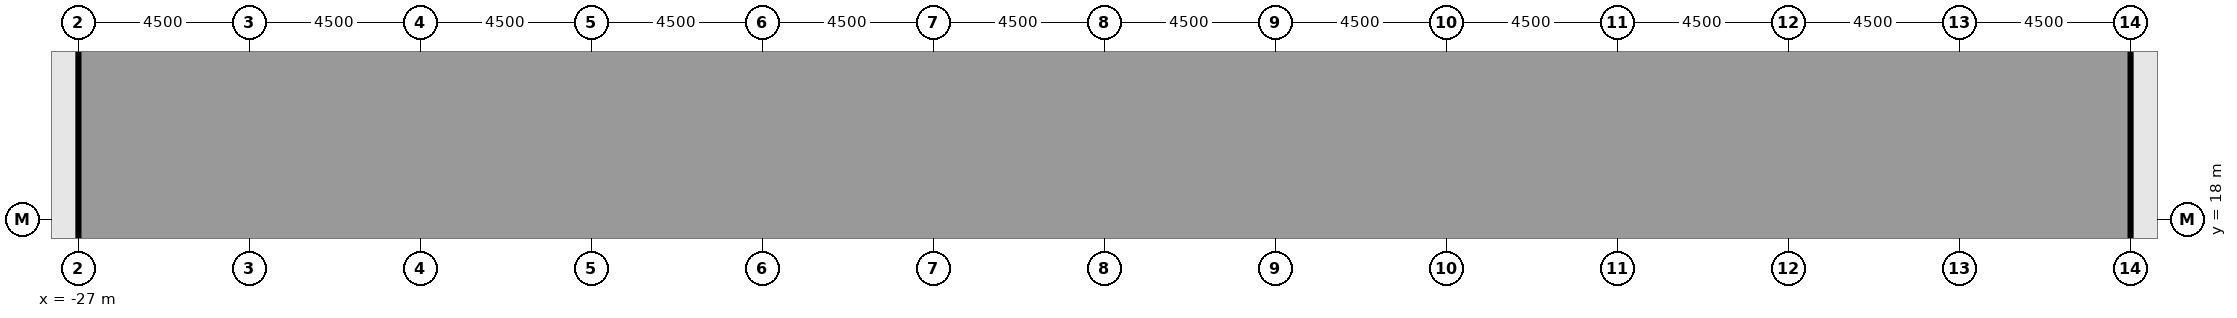
"""IFC4 building model, lengths in metres.
Left out: names, types, materials, properties, quantities, classifications, styles, units other than length and angle.
Written with IfcOpenShell. Run it as: python <this file> out.ifc"""

import sys

from ifc_helpers import new_model, si_unit, direction, frame, frame_2d, origin, origin_2d, place, context, subcontext, project, spatial, rectangle, extrude, element, fill, save


model = new_model("IFC4")
c1 = context("Model", 3, precision=1e-05, world=origin(), true_north=direction((0.0, 1.0)))
c2 = subcontext(c1, "Body", "Model", "MODEL_VIEW")
j1 = project(units=[si_unit("LENGTHUNIT", "METRE"), si_unit("PLANEANGLEUNIT", "RADIAN")], contexts=[c1])
p1 = place(None, origin())
s1 = spatial("IfcSite", under=j1, at=p1, CompositionType="ELEMENT")
p2 = place(p1, origin())
s2 = spatial("IfcBuilding", under=s1, at=p2, CompositionType="ELEMENT")
p3 = place(p2, frame((0.0, 0.0, 7.2)))
s3 = spatial("IfcBuildingStorey", under=s2, at=p3, CompositionType="ELEMENT", Elevation=7.2)
for number, where, z_axis, x_axis in (
    (1, (-27.0, 18.0, -0.45), (0.0, 0.0, 1.0), (1.0, 0.0, 0.0)),
    (2, (-27.0, 22.5, -0.45), (0.0, 0.0, 1.0), (1.0, 0.0, 0.0)),
    (3, (27.0, 18.0, -0.45), (0.0, 0.0, 1.0), (1.0, 0.0, 0.0)),
    (4, (27.0, 22.5, -0.45), (0.0, 0.0, 1.0), (1.0, 0.0, 0.0)),
):
    element("IfcColumn", number, at=place(p3, frame(where, z_axis=z_axis, x_axis=x_axis)), inside=s3, PredefinedType="COLUMN", context=c2, shape_type="SweptSolid", body=[
        extrude(rectangle(XDim=1.4, YDim=1.4, at=origin_2d()), origin(), (0.0, 0.0, 1.0), 4.55),
    ])
for number, where, z_axis, x_axis in (
    (5, (-18.0, 18.0, 0.0), (0.0, 0.0, 1.0), (1.0, 0.0, 0.0)),
    (6, (-18.0, 22.5, 0.0), (0.0, 0.0, 1.0), (1.0, 0.0, 0.0)),
    (7, (-9.0, 22.5, 0.0), (0.0, 0.0, 1.0), (1.0, 0.0, 0.0)),
    (8, (0.0, 22.5, 0.0), (0.0, 0.0, 1.0), (1.0, 0.0, 0.0)),
    (9, (9.0, 22.5, 0.0), (0.0, 0.0, 1.0), (1.0, 0.0, 0.0)),
    (10, (18.0, 22.5, 0.0), (0.0, 0.0, 1.0), (1.0, 0.0, 0.0)),
    (11, (22.5, 18.0, 0.0), (0.0, 0.0, 1.0), (1.0, 0.0, 0.0)),
):
    element("IfcColumn", number, at=place(p3, frame(where, z_axis=z_axis, x_axis=x_axis)), inside=s3, PredefinedType="COLUMN", context=c2, shape_type="SweptSolid", body=[
        extrude(rectangle(XDim=1.6, YDim=1.6, at=origin_2d()), origin(), (0.0, 0.0, 1.0), 4.1),
    ])
p4 = place(p3, frame((-10.0, -9.0, 0.0), z_axis=(0.0, 0.0, 1.0), x_axis=(0.0, 1.0, 0.0)))
e12 = element("IfcWall", 12, at=p4, inside=s3, PredefinedType="SHEAR", context=c2, shape_type="SweptSolid", body=[
    extrude(rectangle(XDim=27.5, YDim=1.0, at=frame_2d((13.75, 0.0))), origin(), (0.0, 0.0, 1.0), 4.1),
])
p5 = place(p4, frame((12.55, 0.0, 0.0)))
e13 = element("IfcOpeningElement", 13, at=p5, cuts=e12, PredefinedType="OPENING", context=c2, shape_type="SweptSolid", body=[
    extrude(rectangle(XDim=2.4, YDim=2.4, at=frame_2d((1.2, 1.2))), frame((0.0, 0.51, 0.0), z_axis=(0.0, -1.0, 0.0), x_axis=(1.0, 0.0, 0.0)), (0.0, 0.0, 1.0), 1.02),
])
p6 = place(p4, frame((6.825, 0.0, 0.0)))
e14 = element("IfcOpeningElement", 14, at=p6, cuts=e12, PredefinedType="OPENING", context=c2, shape_type="SweptSolid", body=[
    extrude(rectangle(XDim=1.2, YDim=2.1, at=frame_2d((0.6, 1.05))), frame((0.0, 0.51, 0.0), z_axis=(0.0, -1.0, 0.0), x_axis=(1.0, 0.0, 0.0)), (0.0, 0.0, 1.0), 1.02),
])
p7 = place(p4, frame((19.475, 0.0, 0.0)))
e15 = element("IfcOpeningElement", 15, at=p7, cuts=e12, PredefinedType="OPENING", context=c2, shape_type="SweptSolid", body=[
    extrude(rectangle(XDim=1.2, YDim=2.1, at=frame_2d((0.6, 1.05))), frame((0.0, 0.51, 0.0), z_axis=(0.0, -1.0, 0.0), x_axis=(1.0, 0.0, 0.0)), (0.0, 0.0, 1.0), 1.02),
])
p8 = place(p3, frame((1.0, -9.0, 0.0), z_axis=(0.0, 0.0, 1.0), x_axis=(0.0, 1.0, 0.0)))
e16 = element("IfcWall", 16, at=p8, inside=s3, PredefinedType="SHEAR", context=c2, shape_type="SweptSolid", body=[
    extrude(rectangle(XDim=27.5, YDim=1.0, at=frame_2d((13.75, 0.0))), origin(), (0.0, 0.0, 1.0), 4.1),
])
p9 = place(p8, frame((12.55, 0.0, 0.0)))
e17 = element("IfcOpeningElement", 17, at=p9, cuts=e16, PredefinedType="OPENING", context=c2, shape_type="SweptSolid", body=[
    extrude(rectangle(XDim=2.4, YDim=2.4, at=frame_2d((1.2, 1.2))), frame((0.0, 0.51, 0.0), z_axis=(0.0, -1.0, 0.0), x_axis=(1.0, 0.0, 0.0)), (0.0, 0.0, 1.0), 1.02),
])
p10 = place(p8, frame((4.025, 0.0, 0.0)))
e18 = element("IfcOpeningElement", 18, at=p10, cuts=e16, PredefinedType="OPENING", context=c2, shape_type="SweptSolid", body=[
    extrude(rectangle(XDim=1.2, YDim=2.1, at=frame_2d((0.6, 1.05))), frame((0.0, 0.51, 0.0), z_axis=(0.0, -1.0, 0.0), x_axis=(1.0, 0.0, 0.0)), (0.0, 0.0, 1.0), 1.02),
])
p11 = place(p8, frame((22.275, 0.0, 0.0)))
e19 = element("IfcOpeningElement", 19, at=p11, cuts=e16, PredefinedType="OPENING", context=c2, shape_type="SweptSolid", body=[
    extrude(rectangle(XDim=1.2, YDim=2.1, at=frame_2d((0.6, 1.05))), frame((0.0, 0.51, 0.0), z_axis=(0.0, -1.0, 0.0), x_axis=(1.0, 0.0, 0.0)), (0.0, 0.0, 1.0), 1.02),
])
p12 = place(p3, frame((-9.5, 18.0, 0.0), z_axis=(0.0, 0.0, 1.0), x_axis=(1.0, 0.0, 0.0)))
e20 = element("IfcWall", 20, at=p12, inside=s3, PredefinedType="SHEAR", context=c2, shape_type="SweptSolid", body=[
    extrude(rectangle(XDim=10.0, YDim=1.0, at=frame_2d((5.0, 0.0))), origin(), (0.0, 0.0, 1.0), 4.1),
])
p13 = place(p3, frame((6.5, -9.0, 0.0), z_axis=(0.0, 0.0, 1.0), x_axis=(0.0, 1.0, 0.0)))
e21 = element("IfcWall", 21, at=p13, inside=s3, PredefinedType="SHEAR", context=c2, shape_type="SweptSolid", body=[
    extrude(rectangle(XDim=27.5, YDim=1.0, at=frame_2d((13.75, 0.0))), origin(), (0.0, 0.0, 1.0), 4.1),
])
p14 = place(p13, frame((12.55, 0.0, 0.0)))
e22 = element("IfcOpeningElement", 22, at=p14, cuts=e21, PredefinedType="OPENING", context=c2, shape_type="SweptSolid", body=[
    extrude(rectangle(XDim=2.4, YDim=2.4, at=frame_2d((1.2, 1.2))), frame((0.0, 0.51, 0.0), z_axis=(0.0, -1.0, 0.0), x_axis=(1.0, 0.0, 0.0)), (0.0, 0.0, 1.0), 1.02),
])
p15 = place(p13, frame((4.025, 0.0, 0.0)))
e23 = element("IfcOpeningElement", 23, at=p15, cuts=e21, PredefinedType="OPENING", context=c2, shape_type="SweptSolid", body=[
    extrude(rectangle(XDim=1.2, YDim=2.1, at=frame_2d((0.6, 1.05))), frame((0.0, 0.51, 0.0), z_axis=(0.0, -1.0, 0.0), x_axis=(1.0, 0.0, 0.0)), (0.0, 0.0, 1.0), 1.02),
])
p16 = place(p13, frame((22.275, 0.0, 0.0)))
e24 = element("IfcOpeningElement", 24, at=p16, cuts=e21, PredefinedType="OPENING", context=c2, shape_type="SweptSolid", body=[
    extrude(rectangle(XDim=1.2, YDim=2.1, at=frame_2d((0.6, 1.05))), frame((0.0, 0.51, 0.0), z_axis=(0.0, -1.0, 0.0), x_axis=(1.0, 0.0, 0.0)), (0.0, 0.0, 1.0), 1.02),
])
p17 = place(p3, frame((17.5, -9.0, 0.0), z_axis=(0.0, 0.0, 1.0), x_axis=(0.0, 1.0, 0.0)))
e25 = element("IfcWall", 25, at=p17, inside=s3, PredefinedType="SHEAR", context=c2, shape_type="SweptSolid", body=[
    extrude(rectangle(XDim=27.5, YDim=1.0, at=frame_2d((13.75, 0.0))), origin(), (0.0, 0.0, 1.0), 4.1),
])
p18 = place(p17, frame((12.55, 0.0, 0.0)))
e26 = element("IfcOpeningElement", 26, at=p18, cuts=e25, PredefinedType="OPENING", context=c2, shape_type="SweptSolid", body=[
    extrude(rectangle(XDim=2.4, YDim=2.4, at=frame_2d((1.2, 1.2))), frame((0.0, 0.51, 0.0), z_axis=(0.0, -1.0, 0.0), x_axis=(1.0, 0.0, 0.0)), (0.0, 0.0, 1.0), 1.02),
])
p19 = place(p17, frame((6.825, 0.0, 0.0)))
e27 = element("IfcOpeningElement", 27, at=p19, cuts=e25, PredefinedType="OPENING", context=c2, shape_type="SweptSolid", body=[
    extrude(rectangle(XDim=1.2, YDim=2.1, at=frame_2d((0.6, 1.05))), frame((0.0, 0.51, 0.0), z_axis=(0.0, -1.0, 0.0), x_axis=(1.0, 0.0, 0.0)), (0.0, 0.0, 1.0), 1.02),
])
p20 = place(p17, frame((19.475, 0.0, 0.0)))
e28 = element("IfcOpeningElement", 28, at=p20, cuts=e25, PredefinedType="OPENING", context=c2, shape_type="SweptSolid", body=[
    extrude(rectangle(XDim=1.2, YDim=2.1, at=frame_2d((0.6, 1.05))), frame((0.0, 0.51, 0.0), z_axis=(0.0, -1.0, 0.0), x_axis=(1.0, 0.0, 0.0)), (0.0, 0.0, 1.0), 1.02),
])
p21 = place(p3, frame((7.0, 18.0, 0.0), z_axis=(0.0, 0.0, 1.0), x_axis=(1.0, 0.0, 0.0)))
e29 = element("IfcWall", 29, at=p21, inside=s3, PredefinedType="SHEAR", context=c2, shape_type="SweptSolid", body=[
    extrude(rectangle(XDim=10.0, YDim=1.0, at=frame_2d((5.0, 0.0))), origin(), (0.0, 0.0, 1.0), 4.1),
])
p22 = place(p3, frame((27.0, 21.8, 0.0), z_axis=(0.0, 0.0, 1.0), x_axis=(0.0, -1.0, 0.0)))
e30 = element("IfcWall", 30, at=p22, inside=s3, PredefinedType="SOLIDWALL", context=c2, shape_type="SweptSolid", body=[
    extrude(rectangle(XDim=3.1, YDim=0.3, at=frame_2d((1.55, 0.0))), origin(), (0.0, 0.0, 1.0), 2.75),
])
p23 = place(p22, frame((0.575, 0.0, 0.8)))
e31 = element("IfcOpeningElement", 31, at=p23, cuts=e30, PredefinedType="OPENING", context=c2, shape_type="SweptSolid", body=[
    extrude(rectangle(XDim=2.4, YDim=1.7, at=frame_2d((1.2, 0.85))), frame((0.0, 0.16, 0.0), z_axis=(0.0, -1.0, 0.0), x_axis=(1.0, 0.0, 0.0)), (0.0, 0.0, 1.0), 0.32),
])
p24 = place(p3, frame((-27.0, 18.7, 0.0), z_axis=(0.0, 0.0, 1.0), x_axis=(0.0, 1.0, 0.0)))
e32 = element("IfcWall", 32, at=p24, inside=s3, PredefinedType="SOLIDWALL", context=c2, shape_type="SweptSolid", body=[
    extrude(rectangle(XDim=3.1, YDim=0.3, at=frame_2d((1.55, 0.0))), origin(), (0.0, 0.0, 1.0), 2.75),
])
p25 = place(p24, frame((0.125, 0.0, 0.8)))
e33 = element("IfcOpeningElement", 33, at=p25, cuts=e32, PredefinedType="OPENING", context=c2, shape_type="SweptSolid", body=[
    extrude(rectangle(XDim=2.4, YDim=1.7, at=frame_2d((1.2, 0.85))), frame((0.0, 0.16, 0.0), z_axis=(0.0, -1.0, 0.0), x_axis=(1.0, 0.0, 0.0)), (0.0, 0.0, 1.0), 0.32),
])
p26 = place(p3, frame((-19.8, -9.0, 0.0), z_axis=(0.0, 0.0, 1.0), x_axis=(0.0, 1.0, 0.0)))
e34 = element("IfcWall", 34, at=p26, inside=s3, PredefinedType="PARTITIONING", context=c2, shape_type="SweptSolid", body=[
    extrude(rectangle(XDim=27.5, YDim=0.15, at=frame_2d((13.75, 0.0))), origin(), (0.0, 0.0, 1.0), 3.65),
])
p27 = place(p26, frame((2.85, 0.0, 0.0)))
e35 = element("IfcOpeningElement", 35, at=p27, cuts=e34, PredefinedType="OPENING", context=c2, shape_type="SweptSolid", body=[
    extrude(rectangle(XDim=1.0, YDim=2.1, at=frame_2d((0.5, 1.05))), frame((0.0, 0.085, 0.0), z_axis=(0.0, -1.0, 0.0), x_axis=(1.0, 0.0, 0.0)), (0.0, 0.0, 1.0), 0.17),
])
p28 = place(p26, frame((15.85, 0.0, 0.0)))
e36 = element("IfcOpeningElement", 36, at=p28, cuts=e34, PredefinedType="OPENING", context=c2, shape_type="SweptSolid", body=[
    extrude(rectangle(XDim=1.0, YDim=2.1, at=frame_2d((0.5, 1.05))), frame((0.0, 0.085, 0.0), z_axis=(0.0, -1.0, 0.0), x_axis=(1.0, 0.0, 0.0)), (0.0, 0.0, 1.0), 0.17),
])
p29 = place(p26, frame((24.35, 0.0, 0.0)))
e37 = element("IfcOpeningElement", 37, at=p29, cuts=e34, PredefinedType="OPENING", context=c2, shape_type="SweptSolid", body=[
    extrude(rectangle(XDim=1.0, YDim=2.1, at=frame_2d((0.5, 1.05))), frame((0.0, 0.085, 0.0), z_axis=(0.0, -1.0, 0.0), x_axis=(1.0, 0.0, 0.0)), (0.0, 0.0, 1.0), 0.17),
])
p30 = place(p3, frame((-13.5, -9.0, 0.0), z_axis=(0.0, 0.0, 1.0), x_axis=(0.0, 1.0, 0.0)))
e38 = element("IfcWall", 38, at=p30, inside=s3, PredefinedType="PARTITIONING", context=c2, shape_type="SweptSolid", body=[
    extrude(rectangle(XDim=27.5, YDim=0.2, at=frame_2d((13.75, 0.0))), origin(), (0.0, 0.0, 1.0), 3.65),
])
p31 = place(p30, frame((3.85, 0.0, 0.0)))
e39 = element("IfcOpeningElement", 39, at=p31, cuts=e38, PredefinedType="OPENING", context=c2, shape_type="SweptSolid", body=[
    extrude(rectangle(XDim=1.0, YDim=2.1, at=frame_2d((0.5, 1.05))), frame((0.0, 0.11, 0.0), z_axis=(0.0, -1.0, 0.0), x_axis=(1.0, 0.0, 0.0)), (0.0, 0.0, 1.0), 0.22),
])
p32 = place(p30, frame((15.1, 0.0, 0.0)))
e40 = element("IfcOpeningElement", 40, at=p32, cuts=e38, PredefinedType="OPENING", context=c2, shape_type="SweptSolid", body=[
    extrude(rectangle(XDim=1.0, YDim=2.1, at=frame_2d((0.5, 1.05))), frame((0.0, 0.11, 0.0), z_axis=(0.0, -1.0, 0.0), x_axis=(1.0, 0.0, 0.0)), (0.0, 0.0, 1.0), 0.22),
])
for number, where, z_axis, x_axis in (
    (41, (-4.5, 21.5, 0.0), (0.0, 0.0, 1.0), (0.0, 1.0, 0.0)),
    (42, (4.5, 21.5, 0.0), (0.0, 0.0, 1.0), (0.0, 1.0, 0.0)),
    (43, (13.5, 21.5, 0.0), (0.0, 0.0, 1.0), (0.0, 1.0, 0.0)),
):
    element("IfcWall", number, at=place(p3, frame(where, z_axis=z_axis, x_axis=x_axis)), inside=s3, PredefinedType="PARTITIONING", context=c2, shape_type="SweptSolid", body=[
        extrude(rectangle(XDim=4.8, YDim=0.2, at=frame_2d((2.4, 0.0))), origin(), (0.0, 0.0, 1.0), 3.65),
    ])
p33 = place(p3, frame((21.0, 18.5, 0.0), z_axis=(0.0, 0.0, 1.0), x_axis=(0.0, -1.0, 0.0)))
e44 = element("IfcWall", 44, at=p33, inside=s3, PredefinedType="PARTITIONING", context=c2, shape_type="SweptSolid", body=[
    extrude(rectangle(XDim=27.5, YDim=0.2, at=frame_2d((13.75, 0.0))), origin(), (0.0, 0.0, 1.0), 3.65),
])
p34 = place(p33, frame((21.9, 0.0, 0.0)))
e45 = element("IfcOpeningElement", 45, at=p34, cuts=e44, PredefinedType="OPENING", context=c2, shape_type="SweptSolid", body=[
    extrude(rectangle(XDim=1.0, YDim=2.1, at=frame_2d((0.5, 1.05))), frame((0.0, 0.11, 0.0), z_axis=(0.0, -1.0, 0.0), x_axis=(1.0, 0.0, 0.0)), (0.0, 0.0, 1.0), 0.22),
])
p35 = place(p33, frame((10.4, 0.0, 0.0)))
e46 = element("IfcOpeningElement", 46, at=p35, cuts=e44, PredefinedType="OPENING", context=c2, shape_type="SweptSolid", body=[
    extrude(rectangle(XDim=1.0, YDim=2.1, at=frame_2d((0.5, 1.05))), frame((0.0, 0.11, 0.0), z_axis=(0.0, -1.0, 0.0), x_axis=(1.0, 0.0, 0.0)), (0.0, 0.0, 1.0), 0.22),
])
p36 = place(p3, frame((-18.8, 18.5, 0.0), z_axis=(0.0, 0.0, 1.0), x_axis=(-1.0, 0.0, 0.0)))
e47 = element("IfcWall", 47, at=p36, inside=s3, PredefinedType="PARTITIONING", context=c2, shape_type="SweptSolid", body=[
    extrude(rectangle(XDim=7.5, YDim=0.2, at=frame_2d((3.75, 0.0))), origin(), (0.0, 0.0, 1.0), 3.65),
])
p37 = place(p36, frame((4.6, 0.0, 0.0)))
e48 = element("IfcOpeningElement", 48, at=p37, cuts=e47, PredefinedType="OPENING", context=c2, shape_type="SweptSolid", body=[
    extrude(rectangle(XDim=1.0, YDim=2.1, at=frame_2d((0.5, 1.05))), frame((0.0, 0.11, 0.0), z_axis=(0.0, -1.0, 0.0), x_axis=(1.0, 0.0, 0.0)), (0.0, 0.0, 1.0), 0.22),
])
p38 = place(p3, frame((-17.2, 18.5, 0.0), z_axis=(0.0, 0.0, 1.0), x_axis=(1.0, 0.0, 0.0)))
e49 = element("IfcWall", 49, at=p38, inside=s3, PredefinedType="PARTITIONING", context=c2, shape_type="SweptSolid", body=[
    extrude(rectangle(XDim=3.7, YDim=0.2, at=frame_2d((1.85, 0.0))), origin(), (0.0, 0.0, 1.0), 3.65),
])
p39 = place(p3, frame((1.5, 18.5, 0.0), z_axis=(0.0, 0.0, 1.0), x_axis=(1.0, 0.0, 0.0)))
e50 = element("IfcWall", 50, at=p39, inside=s3, PredefinedType="PARTITIONING", context=c2, shape_type="SweptSolid", body=[
    extrude(rectangle(XDim=4.5, YDim=0.2, at=frame_2d((2.25, 0.0))), origin(), (0.0, 0.0, 1.0), 3.65),
])
p40 = place(p3, frame((21.0, 18.5, 0.0), z_axis=(0.0, 0.0, 1.0), x_axis=(1.0, 0.0, 0.0)))
e51 = element("IfcWall", 51, at=p40, inside=s3, PredefinedType="PARTITIONING", context=c2, shape_type="SweptSolid", body=[
    extrude(rectangle(XDim=0.7, YDim=0.2, at=frame_2d((0.35, 0.0))), origin(), (0.0, 0.0, 1.0), 3.65),
])
p41 = place(p3, frame((26.3, 18.5, 0.0), z_axis=(0.0, 0.0, 1.0), x_axis=(-1.0, 0.0, 0.0)))
e52 = element("IfcWall", 52, at=p41, inside=s3, PredefinedType="PARTITIONING", context=c2, shape_type="SweptSolid", body=[
    extrude(rectangle(XDim=3.0, YDim=0.2, at=frame_2d((1.5, 0.0))), origin(), (0.0, 0.0, 1.0), 3.65),
])
p42 = place(p41, frame((1.7, 0.0, 0.0)))
e53 = element("IfcOpeningElement", 53, at=p42, cuts=e52, PredefinedType="OPENING", context=c2, shape_type="SweptSolid", body=[
    extrude(rectangle(XDim=1.0, YDim=2.1, at=frame_2d((0.5, 1.05))), frame((0.0, 0.11, 0.0), z_axis=(0.0, -1.0, 0.0), x_axis=(1.0, 0.0, 0.0)), (0.0, 0.0, 1.0), 0.22),
])
p43 = place(p3, frame((-26.85, 21.5, 0.0), z_axis=(0.0, 0.0, 1.0), x_axis=(1.0, 0.0, 0.0)))
e54 = element("IfcWall", 54, at=p43, inside=s3, PredefinedType="PARTITIONING", context=c2, shape_type="SweptSolid", body=[
    extrude(rectangle(XDim=53.7, YDim=0.2, at=frame_2d((26.85, 0.0))), origin(), (0.0, 0.0, 1.0), 3.65),
])
p44 = place(p43, frame((2.7, 0.0, 0.0)))
e55 = element("IfcOpeningElement", 55, at=p44, cuts=e54, PredefinedType="OPENING", context=c2, shape_type="SweptSolid", body=[
    extrude(rectangle(XDim=1.0, YDim=2.1, at=frame_2d((0.5, 1.05))), frame((0.0, 0.11, 0.0), z_axis=(0.0, -1.0, 0.0), x_axis=(1.0, 0.0, 0.0)), (0.0, 0.0, 1.0), 0.22),
])
p45 = place(p43, frame((12.95, 0.0, 0.0)))
e56 = element("IfcOpeningElement", 56, at=p45, cuts=e54, PredefinedType="OPENING", context=c2, shape_type="SweptSolid", body=[
    extrude(rectangle(XDim=1.0, YDim=2.1, at=frame_2d((0.5, 1.05))), frame((0.0, 0.11, 0.0), z_axis=(0.0, -1.0, 0.0), x_axis=(1.0, 0.0, 0.0)), (0.0, 0.0, 1.0), 0.22),
])
p46 = place(p43, frame((27.7, 0.0, 0.0)))
e57 = element("IfcOpeningElement", 57, at=p46, cuts=e54, PredefinedType="OPENING", context=c2, shape_type="SweptSolid", body=[
    extrude(rectangle(XDim=1.0, YDim=2.1, at=frame_2d((0.5, 1.05))), frame((0.0, 0.11, 0.0), z_axis=(0.0, -1.0, 0.0), x_axis=(1.0, 0.0, 0.0)), (0.0, 0.0, 1.0), 0.22),
])
p47 = place(p43, frame((33.95, 0.0, 0.0)))
e58 = element("IfcOpeningElement", 58, at=p47, cuts=e54, PredefinedType="OPENING", context=c2, shape_type="SweptSolid", body=[
    extrude(rectangle(XDim=1.0, YDim=2.1, at=frame_2d((0.5, 1.05))), frame((0.0, 0.11, 0.0), z_axis=(0.0, -1.0, 0.0), x_axis=(1.0, 0.0, 0.0)), (0.0, 0.0, 1.0), 0.22),
])
p48 = place(p43, frame((42.2, 0.0, 0.0)))
e59 = element("IfcOpeningElement", 59, at=p48, cuts=e54, PredefinedType="OPENING", context=c2, shape_type="SweptSolid", body=[
    extrude(rectangle(XDim=1.0, YDim=2.1, at=frame_2d((0.5, 1.05))), frame((0.0, 0.11, 0.0), z_axis=(0.0, -1.0, 0.0), x_axis=(1.0, 0.0, 0.0)), (0.0, 0.0, 1.0), 0.22),
])
p49 = place(p43, frame((47.45, 0.0, 0.0)))
e60 = element("IfcOpeningElement", 60, at=p49, cuts=e54, PredefinedType="OPENING", context=c2, shape_type="SweptSolid", body=[
    extrude(rectangle(XDim=1.0, YDim=2.1, at=frame_2d((0.5, 1.05))), frame((0.0, 0.11, 0.0), z_axis=(0.0, -1.0, 0.0), x_axis=(1.0, 0.0, 0.0)), (0.0, 0.0, 1.0), 0.22),
])
p50 = place(p23, origin())
e61 = element("IfcWindow", 61, at=p50, inside=s3, PartitioningType="SINGLE_PANEL", PredefinedType="WINDOW", context=c2, shape_type="SweptSolid", body=[
    extrude(rectangle(XDim=2.4, YDim=1.7, at=frame_2d((1.2, 0.85))), frame((0.0, 0.03, 0.0), z_axis=(0.0, -1.0, 0.0), x_axis=(1.0, 0.0, 0.0)), (0.0, 0.0, 1.0), 0.06),
])
fill(e31, e61)
p51 = place(p25, origin())
e62 = element("IfcWindow", 62, at=p51, inside=s3, PartitioningType="SINGLE_PANEL", PredefinedType="WINDOW", context=c2, shape_type="SweptSolid", body=[
    extrude(rectangle(XDim=2.4, YDim=1.7, at=frame_2d((1.2, 0.85))), frame((0.0, 0.03, 0.0), z_axis=(0.0, -1.0, 0.0), x_axis=(1.0, 0.0, 0.0)), (0.0, 0.0, 1.0), 0.06),
])
fill(e33, e62)
p52 = place(p37, origin())
e63 = element("IfcDoor", 63, at=p52, inside=s3, OperationType="SINGLE_SWING_RIGHT", PredefinedType="DOOR", context=c2, shape_type="SweptSolid", body=[
    extrude(rectangle(XDim=1.0, YDim=2.1, at=frame_2d((0.5, 1.05))), frame((0.0, 0.025, 0.0), z_axis=(0.0, -1.0, 0.0), x_axis=(1.0, 0.0, 0.0)), (0.0, 0.0, 1.0), 0.05),
])
fill(e48, e63)
p53 = place(p42, origin())
e64 = element("IfcDoor", 64, at=p53, inside=s3, OperationType="SINGLE_SWING_RIGHT", PredefinedType="DOOR", context=c2, shape_type="SweptSolid", body=[
    extrude(rectangle(XDim=1.0, YDim=2.1, at=frame_2d((0.5, 1.05))), frame((0.0, 0.025, 0.0), z_axis=(0.0, -1.0, 0.0), x_axis=(1.0, 0.0, 0.0)), (0.0, 0.0, 1.0), 0.05),
])
fill(e53, e64)
p54 = place(p44, origin())
e65 = element("IfcDoor", 65, at=p54, inside=s3, OperationType="SINGLE_SWING_LEFT", PredefinedType="DOOR", context=c2, shape_type="SweptSolid", body=[
    extrude(rectangle(XDim=1.0, YDim=2.1, at=frame_2d((0.5, 1.05))), frame((0.0, 0.025, 0.0), z_axis=(0.0, -1.0, 0.0), x_axis=(1.0, 0.0, 0.0)), (0.0, 0.0, 1.0), 0.05),
])
fill(e55, e65)
p55 = place(p45, origin())
e66 = element("IfcDoor", 66, at=p55, inside=s3, OperationType="SINGLE_SWING_LEFT", PredefinedType="DOOR", context=c2, shape_type="SweptSolid", body=[
    extrude(rectangle(XDim=1.0, YDim=2.1, at=frame_2d((0.5, 1.05))), frame((0.0, 0.025, 0.0), z_axis=(0.0, -1.0, 0.0), x_axis=(1.0, 0.0, 0.0)), (0.0, 0.0, 1.0), 0.05),
])
fill(e56, e66)
p56 = place(p46, origin())
e67 = element("IfcDoor", 67, at=p56, inside=s3, OperationType="SINGLE_SWING_RIGHT", PredefinedType="DOOR", context=c2, shape_type="SweptSolid", body=[
    extrude(rectangle(XDim=1.0, YDim=2.1, at=frame_2d((0.5, 1.05))), frame((0.0, 0.025, 0.0), z_axis=(0.0, -1.0, 0.0), x_axis=(1.0, 0.0, 0.0)), (0.0, 0.0, 1.0), 0.05),
])
fill(e57, e67)
p57 = place(p47, origin())
e68 = element("IfcDoor", 68, at=p57, inside=s3, OperationType="SINGLE_SWING_RIGHT", PredefinedType="DOOR", context=c2, shape_type="SweptSolid", body=[
    extrude(rectangle(XDim=1.0, YDim=2.1, at=frame_2d((0.5, 1.05))), frame((0.0, 0.025, 0.0), z_axis=(0.0, -1.0, 0.0), x_axis=(1.0, 0.0, 0.0)), (0.0, 0.0, 1.0), 0.05),
])
fill(e58, e68)
p58 = place(p48, origin())
e69 = element("IfcDoor", 69, at=p58, inside=s3, OperationType="SINGLE_SWING_RIGHT", PredefinedType="DOOR", context=c2, shape_type="SweptSolid", body=[
    extrude(rectangle(XDim=1.0, YDim=2.1, at=frame_2d((0.5, 1.05))), frame((0.0, 0.025, 0.0), z_axis=(0.0, -1.0, 0.0), x_axis=(1.0, 0.0, 0.0)), (0.0, 0.0, 1.0), 0.05),
])
fill(e59, e69)
p59 = place(p49, origin())
e70 = element("IfcDoor", 70, at=p59, inside=s3, OperationType="SINGLE_SWING_RIGHT", PredefinedType="DOOR", context=c2, shape_type="SweptSolid", body=[
    extrude(rectangle(XDim=1.0, YDim=2.1, at=frame_2d((0.5, 1.05))), frame((0.0, 0.025, 0.0), z_axis=(0.0, -1.0, 0.0), x_axis=(1.0, 0.0, 0.0)), (0.0, 0.0, 1.0), 0.05),
])
fill(e60, e70)
save(model, sys.argv[1])
